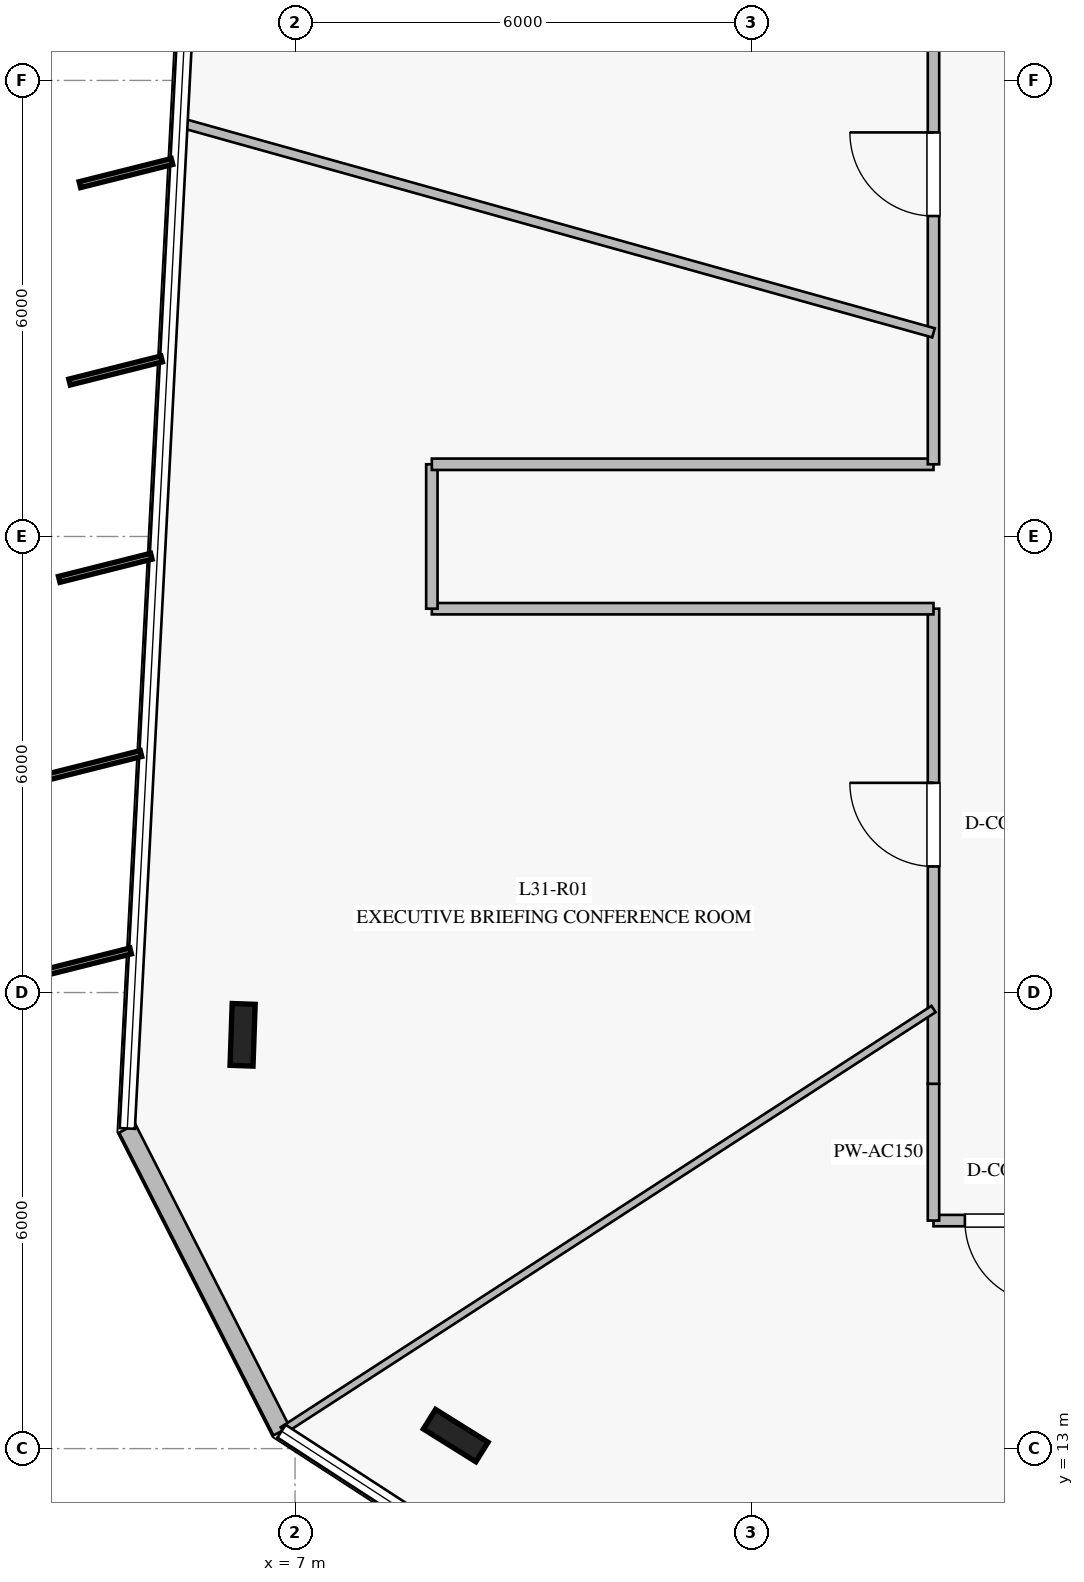
"""IFC4 building model, lengths in metres.
Left out: names, types, materials, properties, quantities, classifications, styles, units other than length and angle.
Written with IfcOpenShell. Run it as: python <this file> out.ifc"""

import sys

from ifc_helpers import new_model, si_unit, direction, frame, frame_2d, origin, origin_2d, place, context, subcontext, project, spatial, rectangle, i_section, extrude, element, fill, save


model = new_model("IFC4")
c1 = context("Model", 3, precision=1e-05, world=origin(), true_north=direction((0.0, 1.0)))
c2 = subcontext(c1, "Body", "Model", "MODEL_VIEW")
j1 = project(units=[si_unit("LENGTHUNIT", "METRE"), si_unit("PLANEANGLEUNIT", "RADIAN")], contexts=[c1])
p1 = place(None, origin())
s1 = spatial("IfcSite", under=j1, at=p1, CompositionType="ELEMENT")
p2 = place(p1, origin())
s2 = spatial("IfcBuilding", under=s1, at=p2, CompositionType="ELEMENT")
p3 = place(p2, frame((0.0, 0.0, 130.4)))
s3 = spatial("IfcBuildingStorey", under=s2, at=p3, CompositionType="ELEMENT", Elevation=130.4)
for number, where, z_axis, x_axis in (
    (1, (6.31, 18.444, 0.0), (0.0, 0.0, 1.0), (0.035, 0.999, 0.0)),
    (2, (9.114, 13.171, 0.0), (0.0, 0.0, 1.0), (-0.848, 0.53, 0.0)),
):
    element("IfcColumn", number, at=place(p3, frame(where, z_axis=z_axis, x_axis=x_axis)), inside=s3, PredefinedType="COLUMN", context=c2, shape_type="SweptSolid", body=[
        extrude(i_section(OverallWidth=0.303, OverallDepth=0.814, WebThickness=0.021, FlangeThickness=0.04, at=origin_2d()), origin(), (0.0, 0.0, 1.0), 4.0),
    ])
p4 = place(p3, frame((4.793, 17.212, 0.0), z_axis=(0.0, 0.0, 1.0), x_axis=(0.454103301767, -0.89094903969, 0.0)))
e3 = element("IfcWall", 3, at=p4, inside=s3, PredefinedType="STANDARD", context=c2, shape_type="SweptSolid", body=[
    extrude(rectangle(XDim=4.47, YDim=0.24, at=frame_2d((2.235, 0.0))), origin(), (0.0, 0.0, 1.0), 3.76),
])
p5 = place(p3, frame((17.2, 16.0, 0.0), z_axis=(0.0, 0.0, 1.0), x_axis=(-1.0, 0.0, 0.0)))
e4 = element("IfcWall", 4, at=p5, inside=s3, PredefinedType="PARTITIONING", context=c2, shape_type="SweptSolid", body=[
    extrude(rectangle(XDim=1.8, YDim=0.15, at=frame_2d((0.9, 0.0))), origin(), (0.0, 0.0, 1.0), 3.36),
])
p6 = place(p5, frame((0.287, 0.0, 0.0)))
e5 = element("IfcOpeningElement", 5, at=p6, cuts=e4, PredefinedType="OPENING", context=c2, shape_type="SweptSolid", body=[
    extrude(rectangle(XDim=1.1, YDim=2.2, at=frame_2d((0.55, 1.1))), frame((0.0, 0.085, 0.0), z_axis=(0.0, -1.0, 0.0), x_axis=(1.0, 0.0, 0.0)), (0.0, 0.0, 1.0), 0.17),
])
p7 = place(p3, frame((15.4, 16.0, 0.0), z_axis=(0.0, 0.0, 1.0), x_axis=(0.0, 1.0, 0.0)))
e6 = element("IfcWall", 6, at=p7, inside=s3, PredefinedType="PARTITIONING", context=c2, shape_type="SweptSolid", body=[
    extrude(rectangle(XDim=1.8, YDim=0.15, at=frame_2d((0.9, 0.0))), origin(), (0.0, 0.0, 1.0), 3.21),
])
p8 = place(p3, frame((15.4, 17.8, 0.0), z_axis=(0.0, 0.0, 1.0), x_axis=(0.0, 1.0, 0.0)))
e7 = element("IfcWall", 7, at=p8, inside=s3, PredefinedType="PARTITIONING", context=c2, shape_type="SweptSolid", body=[
    extrude(rectangle(XDim=6.25, YDim=0.15, at=frame_2d((3.125, 0.0))), origin(), (0.0, 0.0, 1.0), 3.21),
])
p9 = place(p8, frame((2.859, 0.0, 0.0)))
e8 = element("IfcOpeningElement", 8, at=p9, cuts=e7, PredefinedType="OPENING", context=c2, shape_type="SweptSolid", body=[
    extrude(rectangle(XDim=1.1, YDim=2.2, at=frame_2d((0.55, 1.1))), frame((0.0, 0.085, 0.0), z_axis=(0.0, -1.0, 0.0), x_axis=(1.0, 0.0, 0.0)), (0.0, 0.0, 1.0), 0.17),
])
p10 = place(p3, frame((15.4, 24.05, 0.0), z_axis=(0.0, 0.0, 1.0), x_axis=(-1.0, 0.0, 0.0)))
e9 = element("IfcWall", 9, at=p10, inside=s3, PredefinedType="PARTITIONING", context=c2, shape_type="SweptSolid", body=[
    extrude(rectangle(XDim=6.6, YDim=0.15, at=frame_2d((3.3, 0.0))), origin(), (0.0, 0.0, 1.0), 3.02),
])
p11 = place(p3, frame((8.8, 24.05, 0.0), z_axis=(0.0, 0.0, 1.0), x_axis=(0.0, 1.0, 0.0)))
e10 = element("IfcWall", 10, at=p11, inside=s3, PredefinedType="PARTITIONING", context=c2, shape_type="SweptSolid", body=[
    extrude(rectangle(XDim=1.9, YDim=0.15, at=frame_2d((0.95, 0.0))), origin(), (0.0, 0.0, 1.0), 3.76),
])
p12 = place(p3, frame((8.8, 25.95, 0.0), z_axis=(0.0, 0.0, 1.0), x_axis=(1.0, 0.0, 0.0)))
e11 = element("IfcWall", 11, at=p12, inside=s3, PredefinedType="PARTITIONING", context=c2, shape_type="SweptSolid", body=[
    extrude(rectangle(XDim=6.6, YDim=0.15, at=frame_2d((3.3, 0.0))), origin(), (0.0, 0.0, 1.0), 3.02),
])
p13 = place(p3, frame((15.4, 25.95, 0.0), z_axis=(0.0, 0.0, 1.0), x_axis=(0.0, 1.0, 0.0)))
e12 = element("IfcWall", 12, at=p13, inside=s3, PredefinedType="PARTITIONING", context=c2, shape_type="SweptSolid", body=[
    extrude(rectangle(XDim=6.25, YDim=0.15, at=frame_2d((3.125, 0.0))), origin(), (0.0, 0.0, 1.0), 3.21),
])
p14 = place(p13, frame((3.266, 0.0, 0.0)))
e13 = element("IfcOpeningElement", 13, at=p14, cuts=e12, PredefinedType="OPENING", context=c2, shape_type="SweptSolid", body=[
    extrude(rectangle(XDim=1.1, YDim=2.2, at=frame_2d((0.55, 1.1))), frame((0.0, 0.085, 0.0), z_axis=(0.0, -1.0, 0.0), x_axis=(1.0, 0.0, 0.0)), (0.0, 0.0, 1.0), 0.17),
])
p15 = place(p3, frame((15.4, 27.679, 0.0), z_axis=(0.0, 0.0, 1.0), x_axis=(-0.963195872144, 0.268800505737, 0.0)))
e14 = element("IfcWall", 14, at=p15, inside=s3, PredefinedType="PARTITIONING", context=c2, shape_type="SweptSolid", body=[
    extrude(rectangle(XDim=10.275, YDim=0.125, at=frame_2d((5.138, 0.0))), origin(), (0.0, 0.0, 1.0), 3.02),
])
p16 = place(p3, frame((15.4, 18.783, 0.0), z_axis=(0.0, 0.0, 1.0), x_axis=(-0.839399301713, -0.543515236478, 0.0)))
e15 = element("IfcWall", 15, at=p16, inside=s3, PredefinedType="MOVABLE", context=c2, shape_type="SweptSolid", body=[
    extrude(rectangle(XDim=10.2, YDim=0.1, at=frame_2d((5.1, 0.0))), origin(), (0.0, 0.0, 1.0), 3.16),
])
p17 = place(p9, origin())
e16 = element("IfcDoor", 16, at=p17, inside=s3, OperationType="SINGLE_SWING_RIGHT", PredefinedType="DOOR", context=c2, shape_type="SweptSolid", body=[
    extrude(rectangle(XDim=1.1, YDim=2.2, at=frame_2d((0.55, 1.1))), frame((0.0, 0.025, 0.0), z_axis=(0.0, -1.0, 0.0), x_axis=(1.0, 0.0, 0.0)), (0.0, 0.0, 1.0), 0.05),
])
fill(e8, e16)
p18 = place(p6, origin())
e17 = element("IfcDoor", 17, at=p18, inside=s3, OperationType="SINGLE_SWING_LEFT", PredefinedType="DOOR", context=c2, shape_type="SweptSolid", body=[
    extrude(rectangle(XDim=1.1, YDim=2.2, at=frame_2d((0.55, 1.1))), frame((0.0, 0.025, 0.0), z_axis=(0.0, -1.0, 0.0), x_axis=(1.0, 0.0, 0.0)), (0.0, 0.0, 1.0), 0.05),
])
fill(e5, e17)
p19 = place(p14, origin())
e18 = element("IfcDoor", 18, at=p19, inside=s3, OperationType="SINGLE_SWING_RIGHT", PredefinedType="DOOR", context=c2, shape_type="SweptSolid", body=[
    extrude(rectangle(XDim=1.1, YDim=2.2, at=frame_2d((0.55, 1.1))), frame((0.0, 0.025, 0.0), z_axis=(0.0, -1.0, 0.0), x_axis=(1.0, 0.0, 0.0)), (0.0, 0.0, 1.0), 0.05),
])
fill(e13, e18)
save(model, sys.argv[1])
